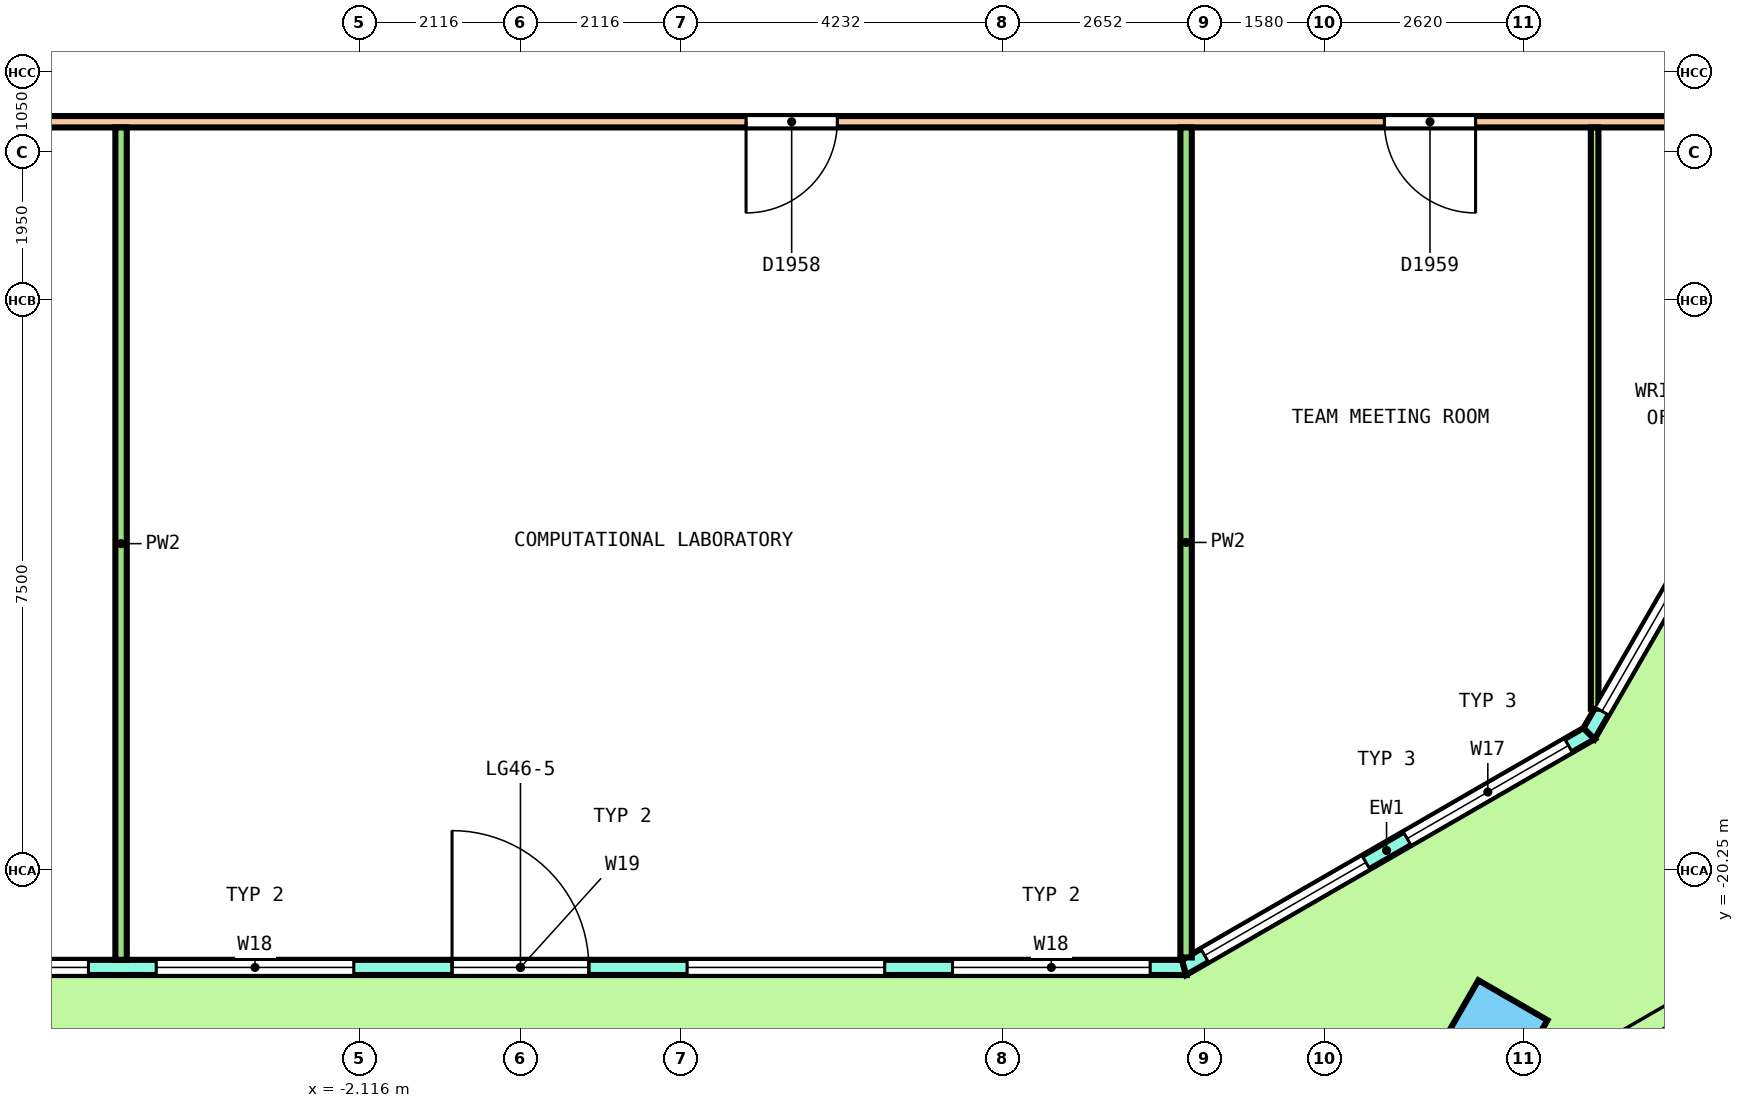
"""IFC4 building model, lengths in metres.
Left out: names, types, materials, properties, quantities, classifications, styles, units other than length and angle.
Written with IfcOpenShell. Run it as: python <this file> out.ifc"""

import sys

from ifc_helpers import new_model, si_unit, direction, frame, frame_2d, origin, origin_2d, place, context, subcontext, project, spatial, polyline, rectangle, outline, extrude, element, fill, save


model = new_model("IFC4")
c1 = context("Model", 3, precision=1e-05, world=origin(), true_north=direction((0.0, 1.0)))
c2 = subcontext(c1, "Body", "Model", "MODEL_VIEW")
j1 = project(units=[si_unit("LENGTHUNIT", "METRE"), si_unit("PLANEANGLEUNIT", "RADIAN")], contexts=[c1])
p1 = place(None, origin())
s1 = spatial("IfcSite", under=j1, at=p1, CompositionType="ELEMENT")
p2 = place(p1, origin())
s2 = spatial("IfcBuilding", under=s1, at=p2, CompositionType="ELEMENT")
p3 = place(p2, frame((0.0, 0.0, 215.4)))
s3 = spatial("IfcBuildingStorey", under=s2, at=p3, CompositionType="ELEMENT", Elevation=215.4)
p4 = place(p3, frame((12.795, -22.412, 0.0), z_axis=(-0.018113955825, -0.03141534774, 0.999342263957), x_axis=(0.86551973078, 0.499889444942, 0.031402841694)))
e1 = element("IfcColumn", 1, at=p4, inside=s3, PredefinedType="COLUMN", context=c2, shape_type="SweptSolid", body=[
    extrude(rectangle(XDim=1.05, YDim=1.05, at=origin_2d()), origin(), (0.0, 0.0, 1.0), 3.653),
])
p5 = place(p3, frame((-8.73, -21.526, 0.0), z_axis=(0.0, 0.0, 1.0), x_axis=(1.0, 0.0, 0.0)))
e2 = element("IfcWall", 2, at=p5, inside=s3, PredefinedType="SOLIDWALL", context=c2, shape_type="SweptSolid", body=[
    extrude(outline(polyline([(-0.027, -0.1), (1.003, -0.1), (2.034, -0.1), (3.064, -0.1), (4.094, -0.1), (5.124, -0.1), (6.155, -0.1), (7.185, -0.1), (8.215, -0.1), (9.245, -0.1), (10.276, -0.1), (11.306, -0.1), (12.336, -0.1), (13.366, -0.1), (14.396, -0.1), (15.427, -0.1), (16.457, -0.1), (17.487, -0.1), (17.434, 0.1), (16.41, 0.1), (15.386, 0.1), (14.362, 0.1), (13.338, 0.1), (12.314, 0.1), (11.29, 0.1), (10.266, 0.1), (9.242, 0.1), (8.218, 0.1), (7.194, 0.1), (6.17, 0.1), (5.146, 0.1), (4.123, 0.1), (3.099, 0.1), (2.075, 0.1), (1.051, 0.1), (0.027, 0.1), (-0.027, -0.1)])), origin(), (0.0, 0.0, 1.0), 3.7),
])
p6 = place(p5, frame((0.446, 0.0, 0.1)))
e3 = element("IfcOpeningElement", 3, at=p6, cuts=e2, PredefinedType="OPENING", context=c2, shape_type="SweptSolid", body=[
    extrude(rectangle(XDim=2.6, YDim=2.65, at=frame_2d((1.3, 1.325))), frame((0.0, 0.11, 0.0), z_axis=(0.0, -1.0, 0.0), x_axis=(1.0, 0.0, 0.0)), (0.0, 0.0, 1.0), 0.22),
])
p7 = place(p5, frame((3.938, 0.0, 0.1)))
e4 = element("IfcOpeningElement", 4, at=p7, cuts=e2, PredefinedType="OPENING", context=c2, shape_type="SweptSolid", body=[
    extrude(rectangle(XDim=2.6, YDim=2.65, at=frame_2d((1.3, 1.325))), frame((0.0, 0.11, 0.0), z_axis=(0.0, -1.0, 0.0), x_axis=(1.0, 0.0, 0.0)), (0.0, 0.0, 1.0), 0.22),
])
p8 = place(p5, frame((7.83, 0.0, 0.0)))
e5 = element("IfcOpeningElement", 5, at=p8, cuts=e2, PredefinedType="OPENING", context=c2, shape_type="SweptSolid", body=[
    extrude(rectangle(XDim=1.8, YDim=2.4, at=frame_2d((0.9, 1.2))), frame((0.0, 0.11, 0.0), z_axis=(0.0, -1.0, 0.0), x_axis=(1.0, 0.0, 0.0)), (0.0, 0.0, 1.0), 0.22),
])
p9 = place(p5, frame((7.83, 0.0, 2.55)))
e6 = element("IfcOpeningElement", 6, at=p9, cuts=e2, PredefinedType="OPENING", context=c2, shape_type="SweptSolid", body=[
    extrude(rectangle(XDim=1.8, YDim=0.2, at=frame_2d((0.9, 0.1))), frame((0.0, 0.11, 0.0), z_axis=(0.0, -1.0, 0.0), x_axis=(1.0, 0.0, 0.0)), (0.0, 0.0, 1.0), 0.22),
])
p10 = place(p5, frame((10.923, 0.0, 0.1)))
e7 = element("IfcOpeningElement", 7, at=p10, cuts=e2, PredefinedType="OPENING", context=c2, shape_type="SweptSolid", body=[
    extrude(rectangle(XDim=2.6, YDim=2.65, at=frame_2d((1.3, 1.325))), frame((0.0, 0.11, 0.0), z_axis=(0.0, -1.0, 0.0), x_axis=(1.0, 0.0, 0.0)), (0.0, 0.0, 1.0), 0.22),
])
p11 = place(p5, frame((14.415, 0.0, 0.1)))
e8 = element("IfcOpeningElement", 8, at=p11, cuts=e2, PredefinedType="OPENING", context=c2, shape_type="SweptSolid", body=[
    extrude(rectangle(XDim=2.6, YDim=2.65, at=frame_2d((1.3, 1.325))), frame((0.0, 0.11, 0.0), z_axis=(0.0, -1.0, 0.0), x_axis=(1.0, 0.0, 0.0)), (0.0, 0.0, 1.0), 0.22),
])
p12 = place(p3, frame((8.73, -21.526, 0.0), z_axis=(0.0, 0.0, 1.0), x_axis=(0.866029647142, 0.499992650217, 0.0)))
e9 = element("IfcWall", 9, at=p12, inside=s3, PredefinedType="SOLIDWALL", context=c2, shape_type="SweptSolid", body=[
    extrude(outline(polyline([(-0.027, -0.1), (1.008, -0.1), (2.042, -0.1), (3.076, -0.1), (4.111, -0.1), (5.145, -0.1), (6.18, -0.1), (6.126, 0.1), (5.109, 0.1), (4.093, 0.1), (3.076, 0.1), (2.06, 0.1), (1.043, 0.1), (0.027, 0.1), (-0.027, -0.1)])), origin(), (0.0, 0.0, 1.0), 3.7),
])
p13 = place(p12, frame((0.313, 0.0, 0.1)))
e10 = element("IfcOpeningElement", 10, at=p13, cuts=e9, PredefinedType="OPENING", context=c2, shape_type="SweptSolid", body=[
    extrude(rectangle(XDim=2.45, YDim=2.65, at=frame_2d((1.225, 1.325))), frame((0.0, 0.11, 0.0), z_axis=(0.0, -1.0, 0.0), x_axis=(1.0, 0.0, 0.0)), (0.0, 0.0, 1.0), 0.22),
])
p14 = place(p12, frame((3.39, 0.0, 0.1)))
e11 = element("IfcOpeningElement", 11, at=p14, cuts=e9, PredefinedType="OPENING", context=c2, shape_type="SweptSolid", body=[
    extrude(rectangle(XDim=2.45, YDim=2.65, at=frame_2d((1.225, 1.325))), frame((0.0, 0.11, 0.0), z_axis=(0.0, -1.0, 0.0), x_axis=(1.0, 0.0, 0.0)), (0.0, 0.0, 1.0), 0.22),
])
p15 = place(p3, frame((14.059, -18.449, 0.0), z_axis=(0.0, 0.0, 1.0), x_axis=(0.500006652623, 0.866021562857, 0.0)))
e12 = element("IfcWall", 12, at=p15, inside=s3, PredefinedType="SOLIDWALL", context=c2, shape_type="SweptSolid", body=[
    extrude(outline(polyline([(-0.027, -0.1), (1.029, -0.1), (2.085, -0.1), (3.141, -0.1), (4.197, -0.1), (5.252, -0.1), (6.308, -0.1), (7.364, -0.1), (8.42, -0.1), (9.476, -0.1), (10.532, -0.1), (11.588, -0.1), (12.644, -0.1), (13.699, -0.1), (14.755, -0.1), (15.811, -0.1), (16.867, -0.1), (17.923, -0.1), (17.869, 0.1), (16.82, 0.1), (15.77, 0.1), (14.721, 0.1), (13.671, 0.1), (12.622, 0.1), (11.572, 0.1), (10.522, 0.1), (9.473, 0.1), (8.423, 0.1), (7.374, 0.1), (6.324, 0.1), (5.275, 0.1), (4.225, 0.1), (3.176, 0.1), (2.126, 0.1), (1.076, 0.1), (0.027, 0.1), (-0.027, -0.1)])), origin(), (0.0, 0.0, 1.0), 3.7),
])
p16 = place(p15, frame((0.34, 0.0, 0.1)))
e13 = element("IfcOpeningElement", 13, at=p16, cuts=e12, PredefinedType="OPENING", context=c2, shape_type="SweptSolid", body=[
    extrude(rectangle(XDim=2.9, YDim=2.65, at=frame_2d((1.45, 1.325))), frame((0.0, 0.11, 0.0), z_axis=(0.0, -1.0, 0.0), x_axis=(1.0, 0.0, 0.0)), (0.0, 0.0, 1.0), 0.22),
])
p17 = place(p15, frame((3.919, 0.0, 0.1)))
e14 = element("IfcOpeningElement", 14, at=p17, cuts=e12, PredefinedType="OPENING", context=c2, shape_type="SweptSolid", body=[
    extrude(rectangle(XDim=2.9, YDim=2.65, at=frame_2d((1.45, 1.325))), frame((0.0, 0.11, 0.0), z_axis=(0.0, -1.0, 0.0), x_axis=(1.0, 0.0, 0.0)), (0.0, 0.0, 1.0), 0.22),
])
p18 = place(p15, frame((8.048, 0.0, 0.0)))
e15 = element("IfcOpeningElement", 15, at=p18, cuts=e12, PredefinedType="OPENING", context=c2, shape_type="SweptSolid", body=[
    extrude(rectangle(XDim=1.8, YDim=2.4, at=frame_2d((0.9, 1.2))), frame((0.0, 0.11, 0.0), z_axis=(0.0, -1.0, 0.0), x_axis=(1.0, 0.0, 0.0)), (0.0, 0.0, 1.0), 0.22),
])
p19 = place(p15, frame((8.048, 0.0, 2.55)))
e16 = element("IfcOpeningElement", 16, at=p19, cuts=e12, PredefinedType="OPENING", context=c2, shape_type="SweptSolid", body=[
    extrude(rectangle(XDim=1.8, YDim=0.2, at=frame_2d((0.9, 0.1))), frame((0.0, 0.11, 0.0), z_axis=(0.0, -1.0, 0.0), x_axis=(1.0, 0.0, 0.0)), (0.0, 0.0, 1.0), 0.22),
])
p20 = place(p15, frame((11.077, 0.0, 0.1)))
e17 = element("IfcOpeningElement", 17, at=p20, cuts=e12, PredefinedType="OPENING", context=c2, shape_type="SweptSolid", body=[
    extrude(rectangle(XDim=2.9, YDim=2.65, at=frame_2d((1.45, 1.325))), frame((0.0, 0.11, 0.0), z_axis=(0.0, -1.0, 0.0), x_axis=(1.0, 0.0, 0.0)), (0.0, 0.0, 1.0), 0.22),
])
p21 = place(p15, frame((14.656, 0.0, 0.1)))
e18 = element("IfcOpeningElement", 18, at=p21, cuts=e12, PredefinedType="OPENING", context=c2, shape_type="SweptSolid", body=[
    extrude(rectangle(XDim=2.9, YDim=2.65, at=frame_2d((1.45, 1.325))), frame((0.0, 0.11, 0.0), z_axis=(0.0, -1.0, 0.0), x_axis=(1.0, 0.0, 0.0)), (0.0, 0.0, 1.0), 0.22),
])
p22 = place(p3, frame((-15.45, -10.4, 0.0), z_axis=(0.0, 0.0, 1.0), x_axis=(1.0, 0.0, 0.0)))
e19 = element("IfcWall", 19, at=p22, inside=s3, PredefinedType="PARTITIONING", context=c2, shape_type="SweptSolid", body=[
    extrude(rectangle(XDim=31.025, YDim=0.15, at=frame_2d((15.512, 0.0))), origin(), (0.0, 0.0, 1.0), 2.8),
])
p23 = place(p22, frame((4.11, 0.0, 0.0)))
e20 = element("IfcOpeningElement", 20, at=p23, cuts=e19, PredefinedType="OPENING", context=c2, shape_type="SweptSolid", body=[
    extrude(rectangle(XDim=1.2, YDim=2.1, at=frame_2d((0.6, 1.05))), frame((0.0, 0.085, 0.0), z_axis=(0.0, -1.0, 0.0), x_axis=(1.0, 0.0, 0.0)), (0.0, 0.0, 1.0), 0.17),
])
p24 = place(p22, frame((18.418, 0.0, 0.0)))
e21 = element("IfcOpeningElement", 21, at=p24, cuts=e19, PredefinedType="OPENING", context=c2, shape_type="SweptSolid", body=[
    extrude(rectangle(XDim=1.2, YDim=2.1, at=frame_2d((0.6, 1.05))), frame((0.0, 0.085, 0.0), z_axis=(0.0, -1.0, 0.0), x_axis=(1.0, 0.0, 0.0)), (0.0, 0.0, 1.0), 0.17),
])
p25 = place(p22, frame((26.816, 0.0, 0.0)))
e22 = element("IfcOpeningElement", 22, at=p25, cuts=e19, PredefinedType="OPENING", context=c2, shape_type="SweptSolid", body=[
    extrude(rectangle(XDim=1.2, YDim=2.1, at=frame_2d((0.6, 1.05))), frame((0.0, 0.085, 0.0), z_axis=(0.0, -1.0, 0.0), x_axis=(1.0, 0.0, 0.0)), (0.0, 0.0, 1.0), 0.17),
])
p26 = place(p3, frame((-5.254, -21.426, 0.0), z_axis=(0.0, 0.0, 1.0), x_axis=(0.0, 1.0, 0.0)))
e23 = element("IfcWall", 23, at=p26, inside=s3, PredefinedType="PARTITIONING", context=c2, shape_type="SweptSolid", body=[
    extrude(rectangle(XDim=10.951, YDim=0.15, at=frame_2d((5.475, 0.0))), origin(), (0.0, 0.0, 1.0), 2.8),
])
p27 = place(p3, frame((8.757, -21.395, 0.0), z_axis=(0.0, 0.0, 1.0), x_axis=(0.0, 1.0, 0.0)))
e24 = element("IfcWall", 24, at=p27, inside=s3, PredefinedType="PARTITIONING", context=c2, shape_type="SweptSolid", body=[
    extrude(rectangle(XDim=10.92, YDim=0.15, at=frame_2d((5.46, 0.0))), origin(), (0.0, 0.0, 1.0), 2.8),
])
p28 = place(p3, frame((14.132, -18.122, 0.0), z_axis=(0.0, 0.0, 1.0), x_axis=(0.0, 1.0, 0.0)))
e25 = element("IfcWall", 25, at=p28, inside=s3, PredefinedType="PARTITIONING", context=c2, shape_type="SweptSolid", body=[
    extrude(rectangle(XDim=7.647, YDim=0.1, at=frame_2d((3.824, 0.0))), origin(), (0.0, 0.0, 1.0), 2.8),
])
p29 = place(p6, origin())
e26 = element("IfcWindow", 26, at=p29, inside=s3, PartitioningType="SINGLE_PANEL", PredefinedType="WINDOW", context=c2, shape_type="SweptSolid", body=[
    extrude(rectangle(XDim=2.6, YDim=2.65, at=frame_2d((1.3, 1.325))), frame((0.0, 0.03, 0.0), z_axis=(0.0, -1.0, 0.0), x_axis=(1.0, 0.0, 0.0)), (0.0, 0.0, 1.0), 0.06),
])
fill(e3, e26)
p30 = place(p7, origin())
e27 = element("IfcWindow", 27, at=p30, inside=s3, PartitioningType="SINGLE_PANEL", PredefinedType="WINDOW", context=c2, shape_type="SweptSolid", body=[
    extrude(rectangle(XDim=2.6, YDim=2.65, at=frame_2d((1.3, 1.325))), frame((0.0, 0.03, 0.0), z_axis=(0.0, -1.0, 0.0), x_axis=(1.0, 0.0, 0.0)), (0.0, 0.0, 1.0), 0.06),
])
fill(e4, e27)
p31 = place(p8, origin())
e28 = element("IfcDoor", 28, at=p31, inside=s3, OperationType="DOUBLE_DOOR_SINGLE_SWING", PredefinedType="DOOR", context=c2, shape_type="SweptSolid", body=[
    extrude(rectangle(XDim=1.8, YDim=2.4, at=frame_2d((0.9, 1.2))), frame((0.0, 0.025, 0.0), z_axis=(0.0, -1.0, 0.0), x_axis=(1.0, 0.0, 0.0)), (0.0, 0.0, 1.0), 0.05),
])
fill(e5, e28)
p32 = place(p9, origin())
e29 = element("IfcWindow", 29, at=p32, inside=s3, PartitioningType="SINGLE_PANEL", PredefinedType="WINDOW", context=c2, shape_type="SweptSolid", body=[
    extrude(rectangle(XDim=1.8, YDim=0.2, at=frame_2d((0.9, 0.1))), frame((0.0, 0.03, 0.0), z_axis=(0.0, -1.0, 0.0), x_axis=(1.0, 0.0, 0.0)), (0.0, 0.0, 1.0), 0.06),
])
fill(e6, e29)
p33 = place(p10, origin())
e30 = element("IfcWindow", 30, at=p33, inside=s3, PartitioningType="SINGLE_PANEL", PredefinedType="WINDOW", context=c2, shape_type="SweptSolid", body=[
    extrude(rectangle(XDim=2.6, YDim=2.65, at=frame_2d((1.3, 1.325))), frame((0.0, 0.03, 0.0), z_axis=(0.0, -1.0, 0.0), x_axis=(1.0, 0.0, 0.0)), (0.0, 0.0, 1.0), 0.06),
])
fill(e7, e30)
p34 = place(p11, origin())
e31 = element("IfcWindow", 31, at=p34, inside=s3, PartitioningType="SINGLE_PANEL", PredefinedType="WINDOW", context=c2, shape_type="SweptSolid", body=[
    extrude(rectangle(XDim=2.6, YDim=2.65, at=frame_2d((1.3, 1.325))), frame((0.0, 0.03, 0.0), z_axis=(0.0, -1.0, 0.0), x_axis=(1.0, 0.0, 0.0)), (0.0, 0.0, 1.0), 0.06),
])
fill(e8, e31)
p35 = place(p13, origin())
e32 = element("IfcWindow", 32, at=p35, inside=s3, PartitioningType="SINGLE_PANEL", PredefinedType="WINDOW", context=c2, shape_type="SweptSolid", body=[
    extrude(rectangle(XDim=2.45, YDim=2.65, at=frame_2d((1.225, 1.325))), frame((0.0, 0.03, 0.0), z_axis=(0.0, -1.0, 0.0), x_axis=(1.0, 0.0, 0.0)), (0.0, 0.0, 1.0), 0.06),
])
fill(e10, e32)
p36 = place(p14, origin())
e33 = element("IfcWindow", 33, at=p36, inside=s3, PartitioningType="SINGLE_PANEL", PredefinedType="WINDOW", context=c2, shape_type="SweptSolid", body=[
    extrude(rectangle(XDim=2.45, YDim=2.65, at=frame_2d((1.225, 1.325))), frame((0.0, 0.03, 0.0), z_axis=(0.0, -1.0, 0.0), x_axis=(1.0, 0.0, 0.0)), (0.0, 0.0, 1.0), 0.06),
])
fill(e11, e33)
p37 = place(p16, origin())
e34 = element("IfcWindow", 34, at=p37, inside=s3, PartitioningType="SINGLE_PANEL", PredefinedType="WINDOW", context=c2, shape_type="SweptSolid", body=[
    extrude(rectangle(XDim=2.9, YDim=2.65, at=frame_2d((1.45, 1.325))), frame((0.0, 0.03, 0.0), z_axis=(0.0, -1.0, 0.0), x_axis=(1.0, 0.0, 0.0)), (0.0, 0.0, 1.0), 0.06),
])
fill(e13, e34)
p38 = place(p24, origin())
e35 = element("IfcDoor", 35, at=p38, inside=s3, OperationType="DOUBLE_DOOR_SINGLE_SWING", PredefinedType="DOOR", context=c2, shape_type="SweptSolid", body=[
    extrude(rectangle(XDim=1.2, YDim=2.1, at=frame_2d((0.6, 1.05))), frame((0.0, 0.025, 0.0), z_axis=(0.0, -1.0, 0.0), x_axis=(1.0, 0.0, 0.0)), (0.0, 0.0, 1.0), 0.05),
])
fill(e21, e35)
p39 = place(p25, origin())
e36 = element("IfcDoor", 36, at=p39, inside=s3, OperationType="DOUBLE_DOOR_SINGLE_SWING", PredefinedType="DOOR", context=c2, shape_type="SweptSolid", body=[
    extrude(rectangle(XDim=1.2, YDim=2.1, at=frame_2d((0.6, 1.05))), frame((0.0, 0.025, 0.0), z_axis=(0.0, -1.0, 0.0), x_axis=(1.0, 0.0, 0.0)), (0.0, 0.0, 1.0), 0.05),
])
fill(e22, e36)
save(model, sys.argv[1])
